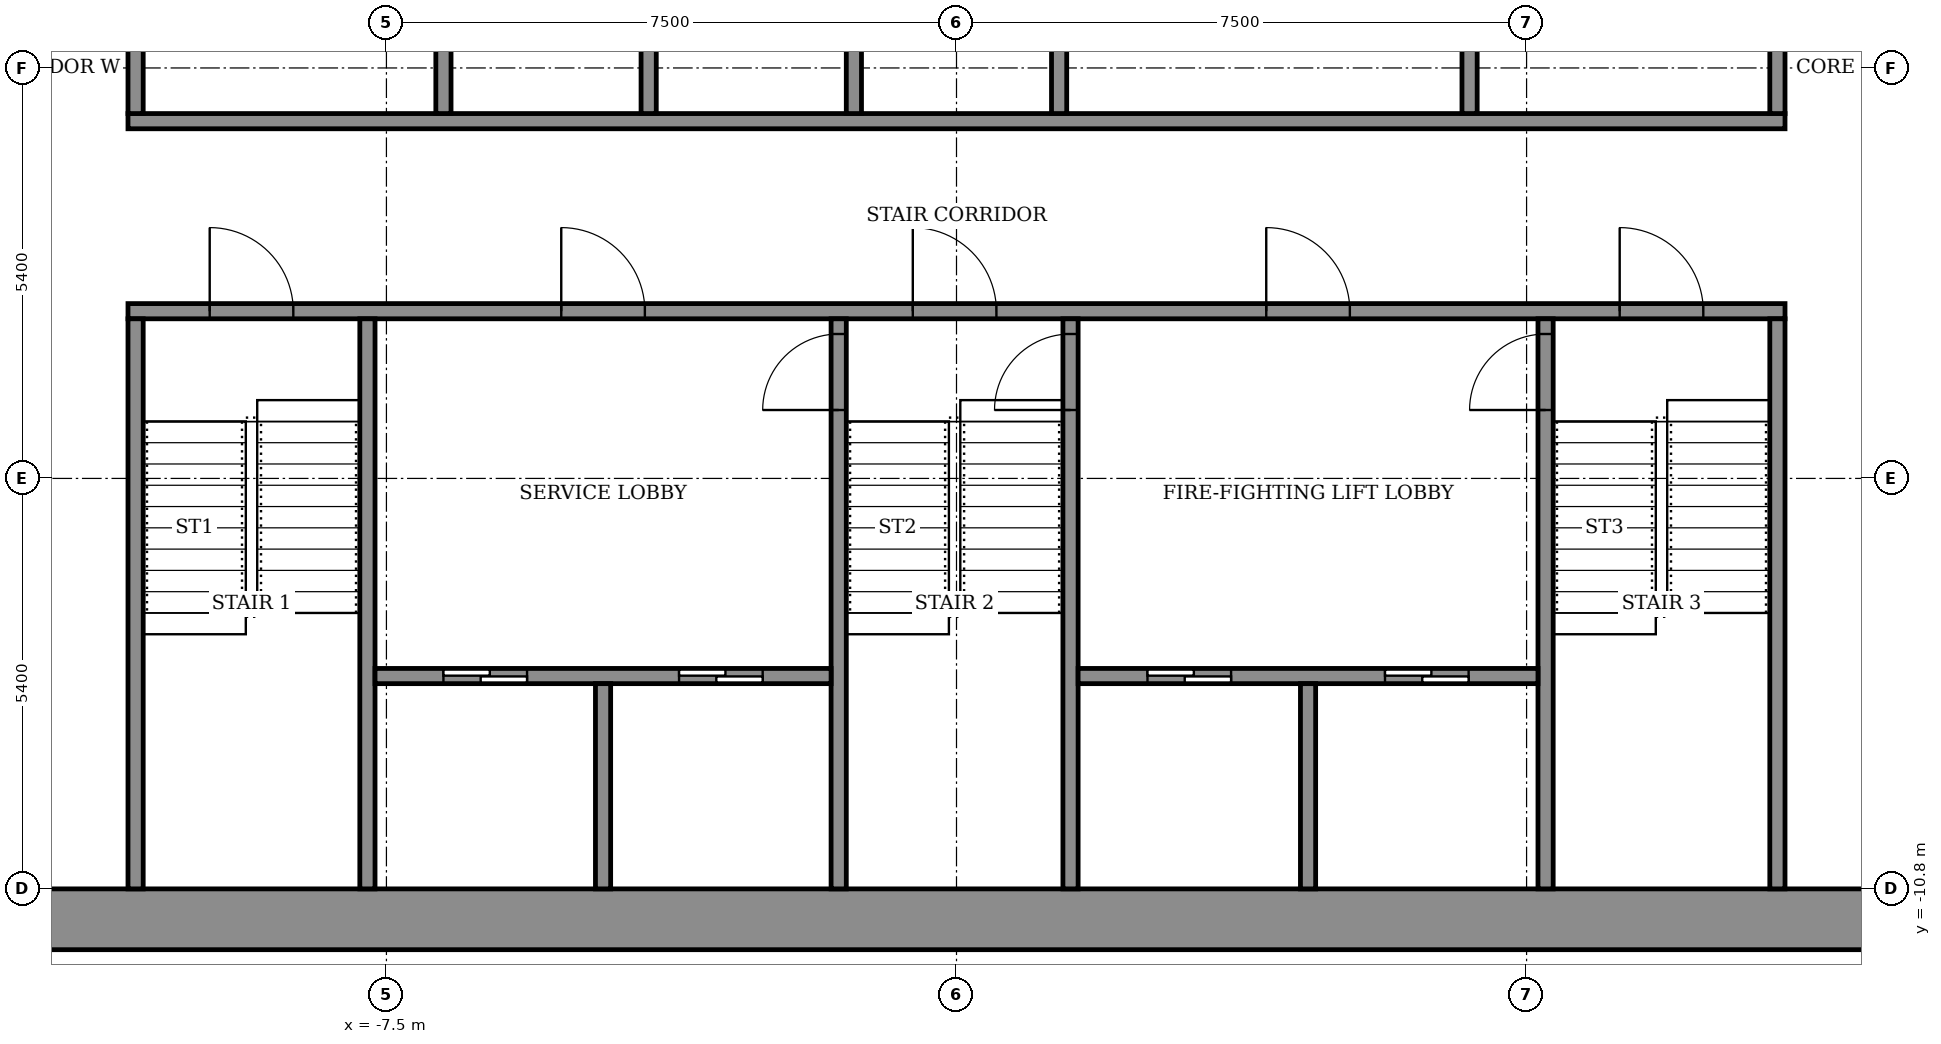
"""IFC4 building model, lengths in metres.
Left out: names, types, materials, properties, quantities, classifications, styles, units other than length and angle.
Written with IfcOpenShell. Run it as: python <this file> out.ifc"""

import sys

from ifc_helpers import new_model, si_unit, direction, frame, frame_2d, origin, place, context, subcontext, project, spatial, rectangle, extrude, element, fill, save


model = new_model("IFC4")
c1 = context("Model", 3, precision=1e-05, world=origin(), true_north=direction((0.0, 1.0)))
c2 = subcontext(c1, "Body", "Model", "MODEL_VIEW")
j1 = project(units=[si_unit("LENGTHUNIT", "METRE"), si_unit("PLANEANGLEUNIT", "RADIAN")], contexts=[c1])
p1 = place(None, origin())
s1 = spatial("IfcSite", under=j1, at=p1, CompositionType="ELEMENT")
p2 = place(p1, origin())
s2 = spatial("IfcBuilding", under=s1, at=p2, CompositionType="ELEMENT")
p3 = place(p2, frame((0.0, 0.0, 241.9)))
s3 = spatial("IfcBuildingStorey", under=s2, at=p3, CompositionType="ELEMENT", Elevation=241.9)
p4 = place(p3, frame((-14.6, -11.2, 0.0), z_axis=(0.0, 0.0, 1.0), x_axis=(1.0, 0.0, 0.0)))
e1 = element("IfcWall", 1, at=p4, inside=s3, PredefinedType="SHEAR", context=c2, shape_type="SweptSolid", body=[
    extrude(rectangle(XDim=29.2, YDim=0.8, at=frame_2d((14.6, 0.0))), origin(), (0.0, 0.0, 1.0), 3.6),
])
p5 = place(p3, frame((-10.9, -3.2, 0.0), z_axis=(0.0, 0.0, 1.0), x_axis=(1.0, 0.0, 0.0)))
e2 = element("IfcWall", 2, at=p5, inside=s3, PredefinedType="SHEAR", context=c2, shape_type="SweptSolid", body=[
    extrude(rectangle(XDim=21.8, YDim=0.2, at=frame_2d((10.9, 0.0))), origin(), (0.0, 0.0, 1.0), 3.05),
])
p6 = place(p5, frame((1.075, 0.0, 0.0)))
e3 = element("IfcOpeningElement", 3, at=p6, cuts=e2, PredefinedType="OPENING", context=c2, shape_type="SweptSolid", body=[
    extrude(rectangle(XDim=1.1, YDim=2.1, at=frame_2d((0.55, 1.05))), frame((0.0, 0.11, 0.0), z_axis=(0.0, -1.0, 0.0), x_axis=(1.0, 0.0, 0.0)), (0.0, 0.0, 1.0), 0.22),
])
p7 = place(p5, frame((10.325, 0.0, 0.0)))
e4 = element("IfcOpeningElement", 4, at=p7, cuts=e2, PredefinedType="OPENING", context=c2, shape_type="SweptSolid", body=[
    extrude(rectangle(XDim=1.1, YDim=2.1, at=frame_2d((0.55, 1.05))), frame((0.0, 0.11, 0.0), z_axis=(0.0, -1.0, 0.0), x_axis=(1.0, 0.0, 0.0)), (0.0, 0.0, 1.0), 0.22),
])
p8 = place(p5, frame((19.625, 0.0, 0.0)))
e5 = element("IfcOpeningElement", 5, at=p8, cuts=e2, PredefinedType="OPENING", context=c2, shape_type="SweptSolid", body=[
    extrude(rectangle(XDim=1.1, YDim=2.1, at=frame_2d((0.55, 1.05))), frame((0.0, 0.11, 0.0), z_axis=(0.0, -1.0, 0.0), x_axis=(1.0, 0.0, 0.0)), (0.0, 0.0, 1.0), 0.22),
])
p9 = place(p5, frame((5.7, 0.0, 0.0)))
e6 = element("IfcOpeningElement", 6, at=p9, cuts=e2, PredefinedType="OPENING", context=c2, shape_type="SweptSolid", body=[
    extrude(rectangle(XDim=1.1, YDim=2.1, at=frame_2d((0.55, 1.05))), frame((0.0, 0.11, 0.0), z_axis=(0.0, -1.0, 0.0), x_axis=(1.0, 0.0, 0.0)), (0.0, 0.0, 1.0), 0.22),
])
p10 = place(p5, frame((14.975, 0.0, 0.0)))
e7 = element("IfcOpeningElement", 7, at=p10, cuts=e2, PredefinedType="OPENING", context=c2, shape_type="SweptSolid", body=[
    extrude(rectangle(XDim=1.1, YDim=2.1, at=frame_2d((0.55, 1.05))), frame((0.0, 0.11, 0.0), z_axis=(0.0, -1.0, 0.0), x_axis=(1.0, 0.0, 0.0)), (0.0, 0.0, 1.0), 0.22),
])
p11 = place(p3, frame((-10.9, -0.7, 0.0), z_axis=(0.0, 0.0, 1.0), x_axis=(1.0, 0.0, 0.0)))
e8 = element("IfcWall", 8, at=p11, inside=s3, PredefinedType="SHEAR", context=c2, shape_type="SweptSolid", body=[
    extrude(rectangle(XDim=21.8, YDim=0.2, at=frame_2d((10.9, 0.0))), origin(), (0.0, 0.0, 1.0), 3.05),
])
for number, where, z_axis, x_axis in (
    (9, (-10.8, -10.8, 0.0), (0.0, 0.0, 1.0), (0.0, 1.0, 0.0)),
    (10, (-7.75, -10.8, 0.0), (0.0, 0.0, 1.0), (0.0, 1.0, 0.0)),
):
    element("IfcWall", number, at=place(p3, frame(where, z_axis=z_axis, x_axis=x_axis)), inside=s3, PredefinedType="SHEAR", context=c2, shape_type="SweptSolid", body=[
        extrude(rectangle(XDim=7.5, YDim=0.2, at=frame_2d((3.75, 0.0))), origin(), (0.0, 0.0, 1.0), 3.05),
    ])
p12 = place(p3, frame((-1.55, -10.8, 0.0), z_axis=(0.0, 0.0, 1.0), x_axis=(0.0, 1.0, 0.0)))
e11 = element("IfcWall", 11, at=p12, inside=s3, PredefinedType="SHEAR", context=c2, shape_type="SweptSolid", body=[
    extrude(rectangle(XDim=7.5, YDim=0.2, at=frame_2d((3.75, 0.0))), origin(), (0.0, 0.0, 1.0), 3.05),
])
p13 = place(p12, frame((6.3, 0.0, 0.0)))
e12 = element("IfcOpeningElement", 12, at=p13, cuts=e11, PredefinedType="OPENING", context=c2, shape_type="SweptSolid", body=[
    extrude(rectangle(XDim=1.0, YDim=2.1, at=frame_2d((0.5, 1.05))), frame((0.0, 0.11, 0.0), z_axis=(0.0, -1.0, 0.0), x_axis=(1.0, 0.0, 0.0)), (0.0, 0.0, 1.0), 0.22),
])
p14 = place(p3, frame((1.5, -10.8, 0.0), z_axis=(0.0, 0.0, 1.0), x_axis=(0.0, 1.0, 0.0)))
e13 = element("IfcWall", 13, at=p14, inside=s3, PredefinedType="SHEAR", context=c2, shape_type="SweptSolid", body=[
    extrude(rectangle(XDim=7.5, YDim=0.2, at=frame_2d((3.75, 0.0))), origin(), (0.0, 0.0, 1.0), 3.05),
])
p15 = place(p14, frame((6.3, 0.0, 0.0)))
e14 = element("IfcOpeningElement", 14, at=p15, cuts=e13, PredefinedType="OPENING", context=c2, shape_type="SweptSolid", body=[
    extrude(rectangle(XDim=1.0, YDim=2.1, at=frame_2d((0.5, 1.05))), frame((0.0, 0.11, 0.0), z_axis=(0.0, -1.0, 0.0), x_axis=(1.0, 0.0, 0.0)), (0.0, 0.0, 1.0), 0.22),
])
p16 = place(p3, frame((7.75, -10.8, 0.0), z_axis=(0.0, 0.0, 1.0), x_axis=(0.0, 1.0, 0.0)))
e15 = element("IfcWall", 15, at=p16, inside=s3, PredefinedType="SHEAR", context=c2, shape_type="SweptSolid", body=[
    extrude(rectangle(XDim=7.5, YDim=0.2, at=frame_2d((3.75, 0.0))), origin(), (0.0, 0.0, 1.0), 3.05),
])
p17 = place(p16, frame((6.3, 0.0, 0.0)))
e16 = element("IfcOpeningElement", 16, at=p17, cuts=e15, PredefinedType="OPENING", context=c2, shape_type="SweptSolid", body=[
    extrude(rectangle(XDim=1.0, YDim=2.1, at=frame_2d((0.5, 1.05))), frame((0.0, 0.11, 0.0), z_axis=(0.0, -1.0, 0.0), x_axis=(1.0, 0.0, 0.0)), (0.0, 0.0, 1.0), 0.22),
])
p18 = place(p3, frame((10.8, -10.8, 0.0), z_axis=(0.0, 0.0, 1.0), x_axis=(0.0, 1.0, 0.0)))
e17 = element("IfcWall", 17, at=p18, inside=s3, PredefinedType="SHEAR", context=c2, shape_type="SweptSolid", body=[
    extrude(rectangle(XDim=7.5, YDim=0.2, at=frame_2d((3.75, 0.0))), origin(), (0.0, 0.0, 1.0), 3.05),
])
p19 = place(p3, frame((-7.65, -8.0, 0.0), z_axis=(0.0, 0.0, 1.0), x_axis=(1.0, 0.0, 0.0)))
e18 = element("IfcWall", 18, at=p19, inside=s3, PredefinedType="SHEAR", context=c2, shape_type="SweptSolid", body=[
    extrude(rectangle(XDim=6.0, YDim=0.2, at=frame_2d((3.0, 0.0))), origin(), (0.0, 0.0, 1.0), 3.05),
])
p20 = place(p19, frame((0.9, 0.0, 0.0)))
e19 = element("IfcOpeningElement", 19, at=p20, cuts=e18, PredefinedType="OPENING", context=c2, shape_type="SweptSolid", body=[
    extrude(rectangle(XDim=1.1, YDim=2.1, at=frame_2d((0.55, 1.05))), frame((0.0, 0.11, 0.0), z_axis=(0.0, -1.0, 0.0), x_axis=(1.0, 0.0, 0.0)), (0.0, 0.0, 1.0), 0.22),
])
p21 = place(p19, frame((4.0, 0.0, 0.0)))
e20 = element("IfcOpeningElement", 20, at=p21, cuts=e18, PredefinedType="OPENING", context=c2, shape_type="SweptSolid", body=[
    extrude(rectangle(XDim=1.1, YDim=2.1, at=frame_2d((0.55, 1.05))), frame((0.0, 0.11, 0.0), z_axis=(0.0, -1.0, 0.0), x_axis=(1.0, 0.0, 0.0)), (0.0, 0.0, 1.0), 0.22),
])
p22 = place(p3, frame((-4.65, -10.8, 0.0), z_axis=(0.0, 0.0, 1.0), x_axis=(0.0, 1.0, 0.0)))
e21 = element("IfcWall", 21, at=p22, inside=s3, PredefinedType="SHEAR", context=c2, shape_type="SweptSolid", body=[
    extrude(rectangle(XDim=2.7, YDim=0.2, at=frame_2d((1.35, 0.0))), origin(), (0.0, 0.0, 1.0), 3.05),
])
p23 = place(p3, frame((1.6, -8.0, 0.0), z_axis=(0.0, 0.0, 1.0), x_axis=(1.0, 0.0, 0.0)))
e22 = element("IfcWall", 22, at=p23, inside=s3, PredefinedType="SHEAR", context=c2, shape_type="SweptSolid", body=[
    extrude(rectangle(XDim=6.05, YDim=0.2, at=frame_2d((3.025, 0.0))), origin(), (0.0, 0.0, 1.0), 3.05),
])
p24 = place(p23, frame((0.913, 0.0, 0.0)))
e23 = element("IfcOpeningElement", 23, at=p24, cuts=e22, PredefinedType="OPENING", context=c2, shape_type="SweptSolid", body=[
    extrude(rectangle(XDim=1.1, YDim=2.1, at=frame_2d((0.55, 1.05))), frame((0.0, 0.11, 0.0), z_axis=(0.0, -1.0, 0.0), x_axis=(1.0, 0.0, 0.0)), (0.0, 0.0, 1.0), 0.22),
])
p25 = place(p23, frame((4.038, 0.0, 0.0)))
e24 = element("IfcOpeningElement", 24, at=p25, cuts=e22, PredefinedType="OPENING", context=c2, shape_type="SweptSolid", body=[
    extrude(rectangle(XDim=1.1, YDim=2.1, at=frame_2d((0.55, 1.05))), frame((0.0, 0.11, 0.0), z_axis=(0.0, -1.0, 0.0), x_axis=(1.0, 0.0, 0.0)), (0.0, 0.0, 1.0), 0.22),
])
p26 = place(p3, frame((4.625, -10.8, 0.0), z_axis=(0.0, 0.0, 1.0), x_axis=(0.0, 1.0, 0.0)))
e25 = element("IfcWall", 25, at=p26, inside=s3, PredefinedType="SHEAR", context=c2, shape_type="SweptSolid", body=[
    extrude(rectangle(XDim=2.7, YDim=0.2, at=frame_2d((1.35, 0.0))), origin(), (0.0, 0.0, 1.0), 3.05),
])
p27 = place(p3, frame((-10.8, -0.6, 0.0), z_axis=(0.0, 0.0, 1.0), x_axis=(0.0, 1.0, 0.0)))
e26 = element("IfcWall", 26, at=p27, inside=s3, PredefinedType="STANDARD", context=c2, shape_type="SweptSolid", body=[
    extrude(rectangle(XDim=2.5, YDim=0.2, at=frame_2d((1.25, 0.0))), origin(), (0.0, 0.0, 1.0), 3.05),
])
for number, where, z_axis, x_axis in (
    (27, (-6.75, -0.6, 0.0), (0.0, 0.0, 1.0), (0.0, 1.0, 0.0)),
    (28, (-4.05, -0.6, 0.0), (0.0, 0.0, 1.0), (0.0, 1.0, 0.0)),
    (29, (-1.35, -0.6, 0.0), (0.0, 0.0, 1.0), (0.0, 1.0, 0.0)),
    (30, (1.35, -0.6, 0.0), (0.0, 0.0, 1.0), (0.0, 1.0, 0.0)),
):
    element("IfcWall", number, at=place(p3, frame(where, z_axis=z_axis, x_axis=x_axis)), inside=s3, PredefinedType="SHEAR", context=c2, shape_type="SweptSolid", body=[
        extrude(rectangle(XDim=2.5, YDim=0.2, at=frame_2d((1.25, 0.0))), origin(), (0.0, 0.0, 1.0), 3.05),
    ])
for number, where, z_axis, x_axis in (
    (31, (6.75, -0.6, 0.0), (0.0, 0.0, 1.0), (0.0, 1.0, 0.0)),
    (32, (10.8, -0.6, 0.0), (0.0, 0.0, 1.0), (0.0, 1.0, 0.0)),
):
    element("IfcWall", number, at=place(p3, frame(where, z_axis=z_axis, x_axis=x_axis)), inside=s3, PredefinedType="STANDARD", context=c2, shape_type="SweptSolid", body=[
        extrude(rectangle(XDim=2.5, YDim=0.2, at=frame_2d((1.25, 0.0))), origin(), (0.0, 0.0, 1.0), 3.05),
    ])
p28 = place(p24, origin())
e33 = element("IfcDoor", 33, at=p28, inside=s3, OperationType="SLIDING_TO_LEFT", PredefinedType="DOOR", context=c2, shape_type="SweptSolid", body=[
    extrude(rectangle(XDim=1.1, YDim=2.1, at=frame_2d((0.55, 1.05))), frame((0.0, 0.025, 0.0), z_axis=(0.0, -1.0, 0.0), x_axis=(1.0, 0.0, 0.0)), (0.0, 0.0, 1.0), 0.05),
])
fill(e23, e33)
p29 = place(p20, origin())
e34 = element("IfcDoor", 34, at=p29, inside=s3, OperationType="SLIDING_TO_LEFT", PredefinedType="DOOR", context=c2, shape_type="SweptSolid", body=[
    extrude(rectangle(XDim=1.1, YDim=2.1, at=frame_2d((0.55, 1.05))), frame((0.0, 0.025, 0.0), z_axis=(0.0, -1.0, 0.0), x_axis=(1.0, 0.0, 0.0)), (0.0, 0.0, 1.0), 0.05),
])
fill(e19, e34)
p30 = place(p25, origin())
e35 = element("IfcDoor", 35, at=p30, inside=s3, OperationType="SLIDING_TO_LEFT", PredefinedType="DOOR", context=c2, shape_type="SweptSolid", body=[
    extrude(rectangle(XDim=1.1, YDim=2.1, at=frame_2d((0.55, 1.05))), frame((0.0, 0.025, 0.0), z_axis=(0.0, -1.0, 0.0), x_axis=(1.0, 0.0, 0.0)), (0.0, 0.0, 1.0), 0.05),
])
fill(e24, e35)
p31 = place(p21, origin())
e36 = element("IfcDoor", 36, at=p31, inside=s3, OperationType="SLIDING_TO_LEFT", PredefinedType="DOOR", context=c2, shape_type="SweptSolid", body=[
    extrude(rectangle(XDim=1.1, YDim=2.1, at=frame_2d((0.55, 1.05))), frame((0.0, 0.025, 0.0), z_axis=(0.0, -1.0, 0.0), x_axis=(1.0, 0.0, 0.0)), (0.0, 0.0, 1.0), 0.05),
])
fill(e20, e36)
p32 = place(p6, origin())
e37 = element("IfcDoor", 37, at=p32, inside=s3, OperationType="SINGLE_SWING_RIGHT", PredefinedType="DOOR", context=c2, shape_type="SweptSolid", body=[
    extrude(rectangle(XDim=1.1, YDim=2.1, at=frame_2d((0.55, 1.05))), frame((0.0, 0.025, 0.0), z_axis=(0.0, -1.0, 0.0), x_axis=(1.0, 0.0, 0.0)), (0.0, 0.0, 1.0), 0.05),
])
fill(e3, e37)
p33 = place(p7, origin())
e38 = element("IfcDoor", 38, at=p33, inside=s3, OperationType="SINGLE_SWING_RIGHT", PredefinedType="DOOR", context=c2, shape_type="SweptSolid", body=[
    extrude(rectangle(XDim=1.1, YDim=2.1, at=frame_2d((0.55, 1.05))), frame((0.0, 0.025, 0.0), z_axis=(0.0, -1.0, 0.0), x_axis=(1.0, 0.0, 0.0)), (0.0, 0.0, 1.0), 0.05),
])
fill(e4, e38)
p34 = place(p8, origin())
e39 = element("IfcDoor", 39, at=p34, inside=s3, OperationType="SINGLE_SWING_RIGHT", PredefinedType="DOOR", context=c2, shape_type="SweptSolid", body=[
    extrude(rectangle(XDim=1.1, YDim=2.1, at=frame_2d((0.55, 1.05))), frame((0.0, 0.025, 0.0), z_axis=(0.0, -1.0, 0.0), x_axis=(1.0, 0.0, 0.0)), (0.0, 0.0, 1.0), 0.05),
])
fill(e5, e39)
p35 = place(p9, origin())
e40 = element("IfcDoor", 40, at=p35, inside=s3, OperationType="SINGLE_SWING_LEFT", PredefinedType="DOOR", context=c2, shape_type="SweptSolid", body=[
    extrude(rectangle(XDim=1.1, YDim=2.1, at=frame_2d((0.55, 1.05))), frame((0.0, 0.025, 0.0), z_axis=(0.0, -1.0, 0.0), x_axis=(1.0, 0.0, 0.0)), (0.0, 0.0, 1.0), 0.05),
])
fill(e6, e40)
p36 = place(p10, origin())
e41 = element("IfcDoor", 41, at=p36, inside=s3, OperationType="SINGLE_SWING_LEFT", PredefinedType="DOOR", context=c2, shape_type="SweptSolid", body=[
    extrude(rectangle(XDim=1.1, YDim=2.1, at=frame_2d((0.55, 1.05))), frame((0.0, 0.025, 0.0), z_axis=(0.0, -1.0, 0.0), x_axis=(1.0, 0.0, 0.0)), (0.0, 0.0, 1.0), 0.05),
])
fill(e7, e41)
p37 = place(p13, origin())
e42 = element("IfcDoor", 42, at=p37, inside=s3, OperationType="SINGLE_SWING_RIGHT", PredefinedType="DOOR", context=c2, shape_type="SweptSolid", body=[
    extrude(rectangle(XDim=1.0, YDim=2.1, at=frame_2d((0.5, 1.05))), frame((0.0, 0.025, 0.0), z_axis=(0.0, -1.0, 0.0), x_axis=(1.0, 0.0, 0.0)), (0.0, 0.0, 1.0), 0.05),
])
fill(e12, e42)
p38 = place(p15, origin())
e43 = element("IfcDoor", 43, at=p38, inside=s3, OperationType="SINGLE_SWING_RIGHT", PredefinedType="DOOR", context=c2, shape_type="SweptSolid", body=[
    extrude(rectangle(XDim=1.0, YDim=2.1, at=frame_2d((0.5, 1.05))), frame((0.0, 0.025, 0.0), z_axis=(0.0, -1.0, 0.0), x_axis=(1.0, 0.0, 0.0)), (0.0, 0.0, 1.0), 0.05),
])
fill(e14, e43)
p39 = place(p17, origin())
e44 = element("IfcDoor", 44, at=p39, inside=s3, OperationType="SINGLE_SWING_RIGHT", PredefinedType="DOOR", context=c2, shape_type="SweptSolid", body=[
    extrude(rectangle(XDim=1.0, YDim=2.1, at=frame_2d((0.5, 1.05))), frame((0.0, 0.025, 0.0), z_axis=(0.0, -1.0, 0.0), x_axis=(1.0, 0.0, 0.0)), (0.0, 0.0, 1.0), 0.05),
])
fill(e16, e44)
save(model, sys.argv[1])
